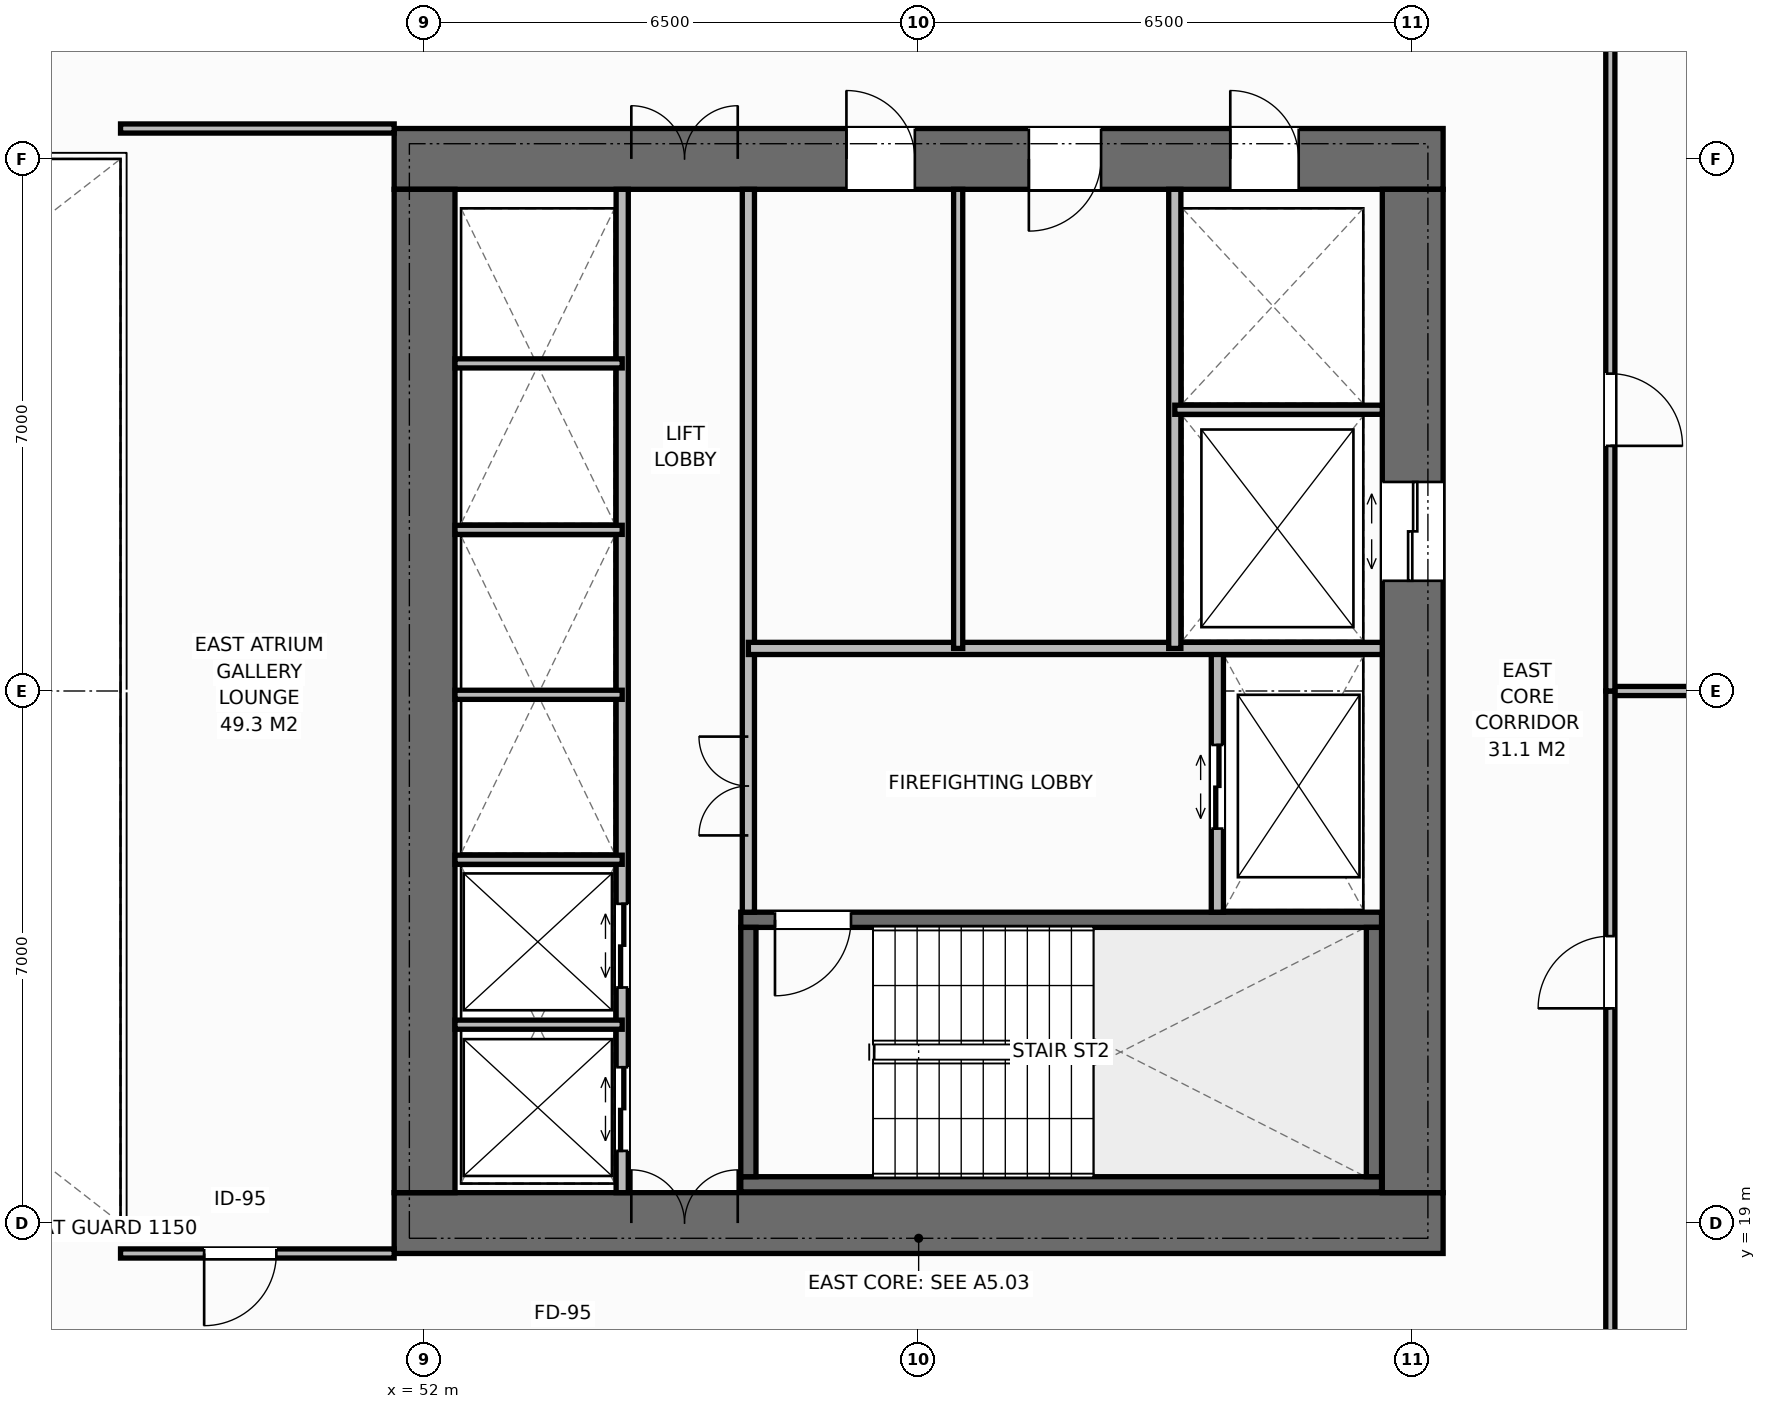
"""IFC4 building model, lengths in metres.
Left out: names, types, materials, properties, quantities, classifications, styles, units other than length and angle.
Written with IfcOpenShell. Run it as: python <this file> out.ifc"""

import sys

from ifc_helpers import new_model, si_unit, direction, frame, frame_2d, origin, place, context, subcontext, project, spatial, rectangle, extrude, element, fill, save


model = new_model("IFC4")
c1 = context("Model", 3, precision=1e-05, world=origin(), true_north=direction((0.0, 1.0)))
c2 = subcontext(c1, "Body", "Model", "MODEL_VIEW")
j1 = project(units=[si_unit("LENGTHUNIT", "METRE"), si_unit("PLANEANGLEUNIT", "RADIAN")], contexts=[c1])
p1 = place(None, origin())
s1 = spatial("IfcSite", under=j1, at=p1, CompositionType="ELEMENT")
p2 = place(p1, origin())
s2 = spatial("IfcBuilding", under=s1, at=p2, CompositionType="ELEMENT")
p3 = place(p2, frame((0.0, 0.0, 31.6)))
s3 = spatial("IfcBuildingStorey", under=s2, at=p3, CompositionType="ELEMENT", Elevation=31.6)
p4 = place(p3, frame((51.6, 19.0, 0.0), z_axis=(0.0, 0.0, 1.0), x_axis=(1.0, 0.0, 0.0)))
e1 = element("IfcWall", 1, at=p4, inside=s3, PredefinedType="SHEAR", context=c2, shape_type="SweptSolid", body=[
    extrude(rectangle(XDim=13.8, YDim=0.8, at=frame_2d((6.9, 0.0))), origin(), (0.0, 0.0, 1.0), 3.8),
])
p5 = place(p4, frame((3.12, 0.0, 0.0)))
e2 = element("IfcOpeningElement", 2, at=p5, cuts=e1, PredefinedType="OPENING", context=c2, shape_type="SweptSolid", body=[
    extrude(rectangle(XDim=1.4, YDim=2.2, at=frame_2d((0.7, 1.1))), frame((0.0, 0.41, 0.0), z_axis=(0.0, -1.0, 0.0), x_axis=(1.0, 0.0, 0.0)), (0.0, 0.0, 1.0), 0.82),
])
p6 = place(p3, frame((51.6, 33.0, 0.0), z_axis=(0.0, 0.0, 1.0), x_axis=(1.0, 0.0, 0.0)))
e3 = element("IfcWall", 3, at=p6, inside=s3, PredefinedType="SHEAR", context=c2, shape_type="SweptSolid", body=[
    extrude(rectangle(XDim=13.8, YDim=0.8, at=frame_2d((6.9, 0.0))), origin(), (0.0, 0.0, 1.0), 3.8),
])
p7 = place(p6, frame((3.12, 0.0, 0.0)))
e4 = element("IfcOpeningElement", 4, at=p7, cuts=e3, PredefinedType="OPENING", context=c2, shape_type="SweptSolid", body=[
    extrude(rectangle(XDim=1.4, YDim=2.2, at=frame_2d((0.7, 1.1))), frame((0.0, 0.41, 0.0), z_axis=(0.0, -1.0, 0.0), x_axis=(1.0, 0.0, 0.0)), (0.0, 0.0, 1.0), 0.82),
])
p8 = place(p6, frame((11.0, 0.0, 0.0)))
e5 = element("IfcOpeningElement", 5, at=p8, cuts=e3, PredefinedType="OPENING", context=c2, shape_type="SweptSolid", body=[
    extrude(rectangle(XDim=0.9, YDim=2.15, at=frame_2d((0.45, 1.075))), frame((0.0, 0.41, 0.0), z_axis=(0.0, -1.0, 0.0), x_axis=(1.0, 0.0, 0.0)), (0.0, 0.0, 1.0), 0.82),
])
p9 = place(p6, frame((5.95, 0.0, 0.0)))
e6 = element("IfcOpeningElement", 6, at=p9, cuts=e3, PredefinedType="OPENING", context=c2, shape_type="SweptSolid", body=[
    extrude(rectangle(XDim=0.9, YDim=2.15, at=frame_2d((0.45, 1.075))), frame((0.0, 0.41, 0.0), z_axis=(0.0, -1.0, 0.0), x_axis=(1.0, 0.0, 0.0)), (0.0, 0.0, 1.0), 0.82),
])
p10 = place(p6, frame((8.35, 0.0, 0.0)))
e7 = element("IfcOpeningElement", 7, at=p10, cuts=e3, PredefinedType="OPENING", context=c2, shape_type="SweptSolid", body=[
    extrude(rectangle(XDim=0.95, YDim=2.15, at=frame_2d((0.475, 1.075))), frame((0.0, 0.41, 0.0), z_axis=(0.0, -1.0, 0.0), x_axis=(1.0, 0.0, 0.0)), (0.0, 0.0, 1.0), 0.82),
])
p11 = place(p3, frame((52.0, 19.4, 0.0), z_axis=(0.0, 0.0, 1.0), x_axis=(0.0, 1.0, 0.0)))
e8 = element("IfcWall", 8, at=p11, inside=s3, PredefinedType="SHEAR", context=c2, shape_type="SweptSolid", body=[
    extrude(rectangle(XDim=13.2, YDim=0.8, at=frame_2d((6.6, 0.0))), origin(), (0.0, 0.0, 1.0), 3.8),
])
p12 = place(p3, frame((65.0, 19.4, 0.0), z_axis=(0.0, 0.0, 1.0), x_axis=(0.0, 1.0, 0.0)))
e9 = element("IfcWall", 9, at=p12, inside=s3, PredefinedType="SHEAR", context=c2, shape_type="SweptSolid", body=[
    extrude(rectangle(XDim=13.2, YDim=0.8, at=frame_2d((6.6, 0.0))), origin(), (0.0, 0.0, 1.0), 3.8),
])
p13 = place(p12, frame((8.05, 0.0, 0.0)))
e10 = element("IfcOpeningElement", 10, at=p13, cuts=e9, PredefinedType="OPENING", context=c2, shape_type="SweptSolid", body=[
    extrude(rectangle(XDim=1.3, YDim=2.2, at=frame_2d((0.65, 1.1))), frame((0.0, 0.41, 0.0), z_axis=(0.0, -1.0, 0.0), x_axis=(1.0, 0.0, 0.0)), (0.0, 0.0, 1.0), 0.82),
])
p14 = place(p3, frame((56.16, 19.51, 0.0), z_axis=(0.0, 0.0, 1.0), x_axis=(1.0, 0.0, 0.0)))
e11 = element("IfcWall", 11, at=p14, inside=s3, PredefinedType="SHEAR", context=c2, shape_type="SweptSolid", body=[
    extrude(rectangle(XDim=8.43, YDim=0.2, at=frame_2d((4.215, 0.0))), origin(), (0.0, 0.0, 1.0), 3.8),
])
p15 = place(p3, frame((56.16, 22.99, 0.0), z_axis=(0.0, 0.0, 1.0), x_axis=(1.0, 0.0, 0.0)))
e12 = element("IfcWall", 12, at=p15, inside=s3, PredefinedType="SHEAR", context=c2, shape_type="SweptSolid", body=[
    extrude(rectangle(XDim=8.43, YDim=0.2, at=frame_2d((4.215, 0.0))), origin(), (0.0, 0.0, 1.0), 3.8),
])
p16 = place(p15, frame((0.45, 0.0, 0.0)))
e13 = element("IfcOpeningElement", 13, at=p16, cuts=e12, PredefinedType="OPENING", context=c2, shape_type="SweptSolid", body=[
    extrude(rectangle(XDim=1.0, YDim=2.15, at=frame_2d((0.5, 1.075))), frame((0.0, 0.11, 0.0), z_axis=(0.0, -1.0, 0.0), x_axis=(1.0, 0.0, 0.0)), (0.0, 0.0, 1.0), 0.22),
])
for number, where, z_axis, x_axis in (
    (14, (56.26, 19.61, 0.0), (0.0, 0.0, 1.0), (0.0, 1.0, 0.0)),
    (15, (64.49, 19.61, 0.0), (0.0, 0.0, 1.0), (0.0, 1.0, 0.0)),
):
    element("IfcWall", number, at=place(p3, frame(where, z_axis=z_axis, x_axis=x_axis)), inside=s3, PredefinedType="SHEAR", context=c2, shape_type="SweptSolid", body=[
        extrude(rectangle(XDim=3.28, YDim=0.2, at=frame_2d((1.64, 0.0))), origin(), (0.0, 0.0, 1.0), 3.8),
    ])
p17 = place(p3, frame((54.6, 19.4, 0.0), z_axis=(0.0, 0.0, 1.0), x_axis=(0.0, 1.0, 0.0)))
e16 = element("IfcWall", 16, at=p17, inside=s3, PredefinedType="STANDARD", context=c2, shape_type="SweptSolid", body=[
    extrude(rectangle(XDim=13.2, YDim=0.16, at=frame_2d((6.6, 0.0))), origin(), (0.0, 0.0, 1.0), 3.55),
])
p18 = place(p17, frame((0.55, 0.0, 0.0)))
e17 = element("IfcOpeningElement", 17, at=p18, cuts=e16, PredefinedType="OPENING", context=c2, shape_type="SweptSolid", body=[
    extrude(rectangle(XDim=1.1, YDim=2.2, at=frame_2d((0.55, 1.1))), frame((0.0, 0.09, 0.0), z_axis=(0.0, -1.0, 0.0), x_axis=(1.0, 0.0, 0.0)), (0.0, 0.0, 1.0), 0.18),
])
p19 = place(p17, frame((2.7, 0.0, 0.0)))
e18 = element("IfcOpeningElement", 18, at=p19, cuts=e16, PredefinedType="OPENING", context=c2, shape_type="SweptSolid", body=[
    extrude(rectangle(XDim=1.1, YDim=2.2, at=frame_2d((0.55, 1.1))), frame((0.0, 0.09, 0.0), z_axis=(0.0, -1.0, 0.0), x_axis=(1.0, 0.0, 0.0)), (0.0, 0.0, 1.0), 0.18),
])
p20 = place(p3, frame((56.26, 23.09, 0.0), z_axis=(0.0, 0.0, 1.0), x_axis=(0.0, 1.0, 0.0)))
e19 = element("IfcWall", 19, at=p20, inside=s3, PredefinedType="STANDARD", context=c2, shape_type="SweptSolid", body=[
    extrude(rectangle(XDim=9.51, YDim=0.16, at=frame_2d((4.755, 0.0))), origin(), (0.0, 0.0, 1.0), 3.55),
])
p21 = place(p20, frame((1.01, 0.0, 0.0)))
e20 = element("IfcOpeningElement", 20, at=p21, cuts=e19, PredefinedType="OPENING", context=c2, shape_type="SweptSolid", body=[
    extrude(rectangle(XDim=1.3, YDim=2.2, at=frame_2d((0.65, 1.1))), frame((0.0, 0.09, 0.0), z_axis=(0.0, -1.0, 0.0), x_axis=(1.0, 0.0, 0.0)), (0.0, 0.0, 1.0), 0.18),
])
for number, where, z_axis, x_axis in (
    (21, (52.4, 21.61, 0.0), (0.0, 0.0, 1.0), (1.0, 0.0, 0.0)),
    (22, (52.4, 23.78, 0.0), (0.0, 0.0, 1.0), (1.0, 0.0, 0.0)),
    (23, (52.4, 25.95, 0.0), (0.0, 0.0, 1.0), (1.0, 0.0, 0.0)),
    (24, (52.4, 28.12, 0.0), (0.0, 0.0, 1.0), (1.0, 0.0, 0.0)),
    (25, (52.4, 30.31, 0.0), (0.0, 0.0, 1.0), (1.0, 0.0, 0.0)),
):
    element("IfcWall", number, at=place(p3, frame(where, z_axis=z_axis, x_axis=x_axis)), inside=s3, PredefinedType="PARTITIONING", context=c2, shape_type="SweptSolid", body=[
        extrude(rectangle(XDim=2.2, YDim=0.12, at=frame_2d((1.1, 0.0))), origin(), (0.0, 0.0, 1.0), 3.55),
    ])
p22 = place(p3, frame((62.43, 23.09, 0.0), z_axis=(0.0, 0.0, 1.0), x_axis=(0.0, 1.0, 0.0)))
e26 = element("IfcWall", 26, at=p22, inside=s3, PredefinedType="STANDARD", context=c2, shape_type="SweptSolid", body=[
    extrude(rectangle(XDim=3.47, YDim=0.16, at=frame_2d((1.735, 0.0))), origin(), (0.0, 0.0, 1.0), 3.55),
])
p23 = place(p22, frame((1.1, 0.0, 0.0)))
e27 = element("IfcOpeningElement", 27, at=p23, cuts=e26, PredefinedType="OPENING", context=c2, shape_type="SweptSolid", body=[
    extrude(rectangle(XDim=1.1, YDim=2.2, at=frame_2d((0.55, 1.1))), frame((0.0, 0.09, 0.0), z_axis=(0.0, -1.0, 0.0), x_axis=(1.0, 0.0, 0.0)), (0.0, 0.0, 1.0), 0.18),
])
p24 = place(p3, frame((56.26, 26.56, 0.0), z_axis=(0.0, 0.0, 1.0), x_axis=(1.0, 0.0, 0.0)))
e28 = element("IfcWall", 28, at=p24, inside=s3, PredefinedType="STANDARD", context=c2, shape_type="SweptSolid", body=[
    extrude(rectangle(XDim=8.34, YDim=0.16, at=frame_2d((4.17, 0.0))), origin(), (0.0, 0.0, 1.0), 3.55),
])
p25 = place(p3, frame((61.87, 26.56, 0.0), z_axis=(0.0, 0.0, 1.0), x_axis=(0.0, 1.0, 0.0)))
e29 = element("IfcWall", 29, at=p25, inside=s3, PredefinedType="STANDARD", context=c2, shape_type="SweptSolid", body=[
    extrude(rectangle(XDim=6.04, YDim=0.16, at=frame_2d((3.02, 0.0))), origin(), (0.0, 0.0, 1.0), 3.55),
])
p26 = place(p3, frame((61.87, 29.7, 0.0), z_axis=(0.0, 0.0, 1.0), x_axis=(1.0, 0.0, 0.0)))
e30 = element("IfcWall", 30, at=p26, inside=s3, PredefinedType="PARTITIONING", context=c2, shape_type="SweptSolid", body=[
    extrude(rectangle(XDim=2.73, YDim=0.12, at=frame_2d((1.365, 0.0))), origin(), (0.0, 0.0, 1.0), 3.55),
])
p27 = place(p3, frame((59.02, 26.56, 0.0), z_axis=(0.0, 0.0, 1.0), x_axis=(0.0, 1.0, 0.0)))
e31 = element("IfcWall", 31, at=p27, inside=s3, PredefinedType="PARTITIONING", context=c2, shape_type="SweptSolid", body=[
    extrude(rectangle(XDim=6.04, YDim=0.12, at=frame_2d((3.02, 0.0))), origin(), (0.0, 0.0, 1.0), 3.55),
])
p28 = place(p3, frame((48.0, 33.4, 0.0), z_axis=(0.0, 0.0, 1.0), x_axis=(1.0, 0.0, 0.0)))
e32 = element("IfcWall", 32, at=p28, inside=s3, PredefinedType="PARTITIONING", context=c2, shape_type="SweptSolid", body=[
    extrude(rectangle(XDim=3.6, YDim=0.12, at=frame_2d((1.8, 0.0))), origin(), (0.0, 0.0, 1.0), 3.55),
])
p29 = place(p3, frame((48.0, 18.6, 0.0), z_axis=(0.0, 0.0, 1.0), x_axis=(1.0, 0.0, 0.0)))
e33 = element("IfcWall", 33, at=p29, inside=s3, PredefinedType="PARTITIONING", context=c2, shape_type="SweptSolid", body=[
    extrude(rectangle(XDim=3.6, YDim=0.12, at=frame_2d((1.8, 0.0))), origin(), (0.0, 0.0, 1.0), 3.55),
])
p30 = place(p29, frame((1.1, 0.0, 0.0)))
e34 = element("IfcOpeningElement", 34, at=p30, cuts=e33, PredefinedType="OPENING", context=c2, shape_type="SweptSolid", body=[
    extrude(rectangle(XDim=0.95, YDim=2.15, at=frame_2d((0.475, 1.075))), frame((0.0, 0.07, 0.0), z_axis=(0.0, -1.0, 0.0), x_axis=(1.0, 0.0, 0.0)), (0.0, 0.0, 1.0), 0.14),
])
p31 = place(p3, frame((67.6, 26.0, 0.0), z_axis=(0.0, 0.0, 1.0), x_axis=(1.0, 0.0, 0.0)))
e35 = element("IfcWall", 35, at=p31, inside=s3, PredefinedType="PARTITIONING", context=c2, shape_type="SweptSolid", body=[
    extrude(rectangle(XDim=10.58, YDim=0.12, at=frame_2d((5.29, 0.0))), origin(), (0.0, 0.0, 1.0), 3.55),
])
p32 = place(p3, frame((67.6, 16.5, 0.0), z_axis=(0.0, 0.0, 1.0), x_axis=(0.0, 1.0, 0.0)))
e36 = element("IfcWall", 36, at=p32, inside=s3, PredefinedType="PARTITIONING", context=c2, shape_type="SweptSolid", body=[
    extrude(rectangle(XDim=9.5, YDim=0.12, at=frame_2d((4.75, 0.0))), origin(), (0.0, 0.0, 1.0), 3.55),
])
p33 = place(p32, frame((5.325, 0.0, 0.0)))
e37 = element("IfcOpeningElement", 37, at=p33, cuts=e36, PredefinedType="OPENING", context=c2, shape_type="SweptSolid", body=[
    extrude(rectangle(XDim=0.95, YDim=2.15, at=frame_2d((0.475, 1.075))), frame((0.0, 0.07, 0.0), z_axis=(0.0, -1.0, 0.0), x_axis=(1.0, 0.0, 0.0)), (0.0, 0.0, 1.0), 0.14),
])
p34 = place(p3, frame((67.6, 26.0, 0.0), z_axis=(0.0, 0.0, 1.0), x_axis=(0.0, 1.0, 0.0)))
e38 = element("IfcWall", 38, at=p34, inside=s3, PredefinedType="PARTITIONING", context=c2, shape_type="SweptSolid", body=[
    extrude(rectangle(XDim=9.5, YDim=0.12, at=frame_2d((4.75, 0.0))), origin(), (0.0, 0.0, 1.0), 3.55),
])
p35 = place(p34, frame((3.225, 0.0, 0.0)))
e39 = element("IfcOpeningElement", 39, at=p35, cuts=e38, PredefinedType="OPENING", context=c2, shape_type="SweptSolid", body=[
    extrude(rectangle(XDim=0.95, YDim=2.15, at=frame_2d((0.475, 1.075))), frame((0.0, 0.07, 0.0), z_axis=(0.0, -1.0, 0.0), x_axis=(1.0, 0.0, 0.0)), (0.0, 0.0, 1.0), 0.14),
])
p36 = place(p5, origin())
e40 = element("IfcDoor", 40, at=p36, inside=s3, OperationType="DOUBLE_DOOR_SINGLE_SWING", PredefinedType="DOOR", context=c2, shape_type="SweptSolid", body=[
    extrude(rectangle(XDim=1.4, YDim=2.2, at=frame_2d((0.7, 1.1))), frame((0.0, 0.125, 0.0), z_axis=(0.0, -1.0, 0.0), x_axis=(1.0, 0.0, 0.0)), (0.0, 0.0, 1.0), 0.05),
])
fill(e2, e40)
p37 = place(p7, origin())
e41 = element("IfcDoor", 41, at=p37, inside=s3, OperationType="DOUBLE_DOOR_SINGLE_SWING", PredefinedType="DOOR", context=c2, shape_type="SweptSolid", body=[
    extrude(rectangle(XDim=1.4, YDim=2.2, at=frame_2d((0.7, 1.1))), frame((0.0, -0.075, 0.0), z_axis=(0.0, -1.0, 0.0), x_axis=(1.0, 0.0, 0.0)), (0.0, 0.0, 1.0), 0.05),
])
fill(e4, e41)
p38 = place(p18, origin())
e42 = element("IfcDoor", 42, at=p38, inside=s3, OperationType="DOUBLE_DOOR_SLIDING", PredefinedType="DOOR", context=c2, shape_type="SweptSolid", body=[
    extrude(rectangle(XDim=1.1, YDim=2.2, at=frame_2d((0.55, 1.1))), frame((0.0, 0.025, 0.0), z_axis=(0.0, -1.0, 0.0), x_axis=(1.0, 0.0, 0.0)), (0.0, 0.0, 1.0), 0.05),
])
fill(e17, e42)
p39 = place(p19, origin())
e43 = element("IfcDoor", 43, at=p39, inside=s3, OperationType="DOUBLE_DOOR_SLIDING", PredefinedType="DOOR", context=c2, shape_type="SweptSolid", body=[
    extrude(rectangle(XDim=1.1, YDim=2.2, at=frame_2d((0.55, 1.1))), frame((0.0, 0.025, 0.0), z_axis=(0.0, -1.0, 0.0), x_axis=(1.0, 0.0, 0.0)), (0.0, 0.0, 1.0), 0.05),
])
fill(e18, e43)
p40 = place(p16, origin())
e44 = element("IfcDoor", 44, at=p40, inside=s3, OperationType="SINGLE_SWING_RIGHT", PredefinedType="DOOR", context=c2, shape_type="SweptSolid", body=[
    extrude(rectangle(XDim=1.0, YDim=2.15, at=frame_2d((0.5, 1.075))), frame((0.0, 0.025, 0.0), z_axis=(0.0, -1.0, 0.0), x_axis=(1.0, 0.0, 0.0)), (0.0, 0.0, 1.0), 0.05),
])
fill(e13, e44)
p41 = place(p23, origin())
e45 = element("IfcDoor", 45, at=p41, inside=s3, OperationType="DOUBLE_DOOR_SLIDING", PredefinedType="DOOR", context=c2, shape_type="SweptSolid", body=[
    extrude(rectangle(XDim=1.1, YDim=2.2, at=frame_2d((0.55, 1.1))), frame((0.0, 0.025, 0.0), z_axis=(0.0, -1.0, 0.0), x_axis=(1.0, 0.0, 0.0)), (0.0, 0.0, 1.0), 0.05),
])
fill(e27, e45)
p42 = place(p21, origin())
e46 = element("IfcDoor", 46, at=p42, inside=s3, OperationType="DOUBLE_DOOR_SINGLE_SWING", PredefinedType="DOOR", context=c2, shape_type="SweptSolid", body=[
    extrude(rectangle(XDim=1.3, YDim=2.2, at=frame_2d((0.65, 1.1))), frame((0.0, 0.025, 0.0), z_axis=(0.0, -1.0, 0.0), x_axis=(1.0, 0.0, 0.0)), (0.0, 0.0, 1.0), 0.05),
])
fill(e20, e46)
p43 = place(p13, origin())
e47 = element("IfcDoor", 47, at=p43, inside=s3, OperationType="DOUBLE_DOOR_SLIDING", PredefinedType="DOOR", context=c2, shape_type="SweptSolid", body=[
    extrude(rectangle(XDim=1.3, YDim=2.2, at=frame_2d((0.65, 1.1))), frame((0.0, 0.025, 0.0), z_axis=(0.0, -1.0, 0.0), x_axis=(1.0, 0.0, 0.0)), (0.0, 0.0, 1.0), 0.05),
])
fill(e10, e47)
p44 = place(p8, origin())
e48 = element("IfcDoor", 48, at=p44, inside=s3, OperationType="SINGLE_SWING_LEFT", PredefinedType="DOOR", context=c2, shape_type="SweptSolid", body=[
    extrude(rectangle(XDim=0.9, YDim=2.15, at=frame_2d((0.45, 1.075))), frame((0.0, -0.075, 0.0), z_axis=(0.0, -1.0, 0.0), x_axis=(1.0, 0.0, 0.0)), (0.0, 0.0, 1.0), 0.05),
])
fill(e5, e48)
p45 = place(p9, origin())
e49 = element("IfcDoor", 49, at=p45, inside=s3, OperationType="SINGLE_SWING_LEFT", PredefinedType="DOOR", context=c2, shape_type="SweptSolid", body=[
    extrude(rectangle(XDim=0.9, YDim=2.15, at=frame_2d((0.45, 1.075))), frame((0.0, -0.075, 0.0), z_axis=(0.0, -1.0, 0.0), x_axis=(1.0, 0.0, 0.0)), (0.0, 0.0, 1.0), 0.05),
])
fill(e6, e49)
p46 = place(p10, origin())
e50 = element("IfcDoor", 50, at=p46, inside=s3, OperationType="SINGLE_SWING_RIGHT", PredefinedType="DOOR", context=c2, shape_type="SweptSolid", body=[
    extrude(rectangle(XDim=0.95, YDim=2.15, at=frame_2d((0.475, 1.075))), frame((0.0, -0.075, 0.0), z_axis=(0.0, -1.0, 0.0), x_axis=(1.0, 0.0, 0.0)), (0.0, 0.0, 1.0), 0.05),
])
fill(e7, e50)
p47 = place(p30, origin())
e51 = element("IfcDoor", 51, at=p47, inside=s3, OperationType="SINGLE_SWING_RIGHT", PredefinedType="DOOR", context=c2, shape_type="SweptSolid", body=[
    extrude(rectangle(XDim=0.95, YDim=2.15, at=frame_2d((0.475, 1.075))), frame((0.0, 0.025, 0.0), z_axis=(0.0, -1.0, 0.0), x_axis=(1.0, 0.0, 0.0)), (0.0, 0.0, 1.0), 0.05),
])
fill(e34, e51)
p48 = place(p33, origin())
e52 = element("IfcDoor", 52, at=p48, inside=s3, OperationType="SINGLE_SWING_LEFT", PredefinedType="DOOR", context=c2, shape_type="SweptSolid", body=[
    extrude(rectangle(XDim=0.95, YDim=2.15, at=frame_2d((0.475, 1.075))), frame((0.0, 0.025, 0.0), z_axis=(0.0, -1.0, 0.0), x_axis=(1.0, 0.0, 0.0)), (0.0, 0.0, 1.0), 0.05),
])
fill(e37, e52)
p49 = place(p35, origin())
e53 = element("IfcDoor", 53, at=p49, inside=s3, OperationType="SINGLE_SWING_RIGHT", PredefinedType="DOOR", context=c2, shape_type="SweptSolid", body=[
    extrude(rectangle(XDim=0.95, YDim=2.15, at=frame_2d((0.475, 1.075))), frame((0.0, 0.025, 0.0), z_axis=(0.0, -1.0, 0.0), x_axis=(1.0, 0.0, 0.0)), (0.0, 0.0, 1.0), 0.05),
])
fill(e39, e53)
save(model, sys.argv[1])
